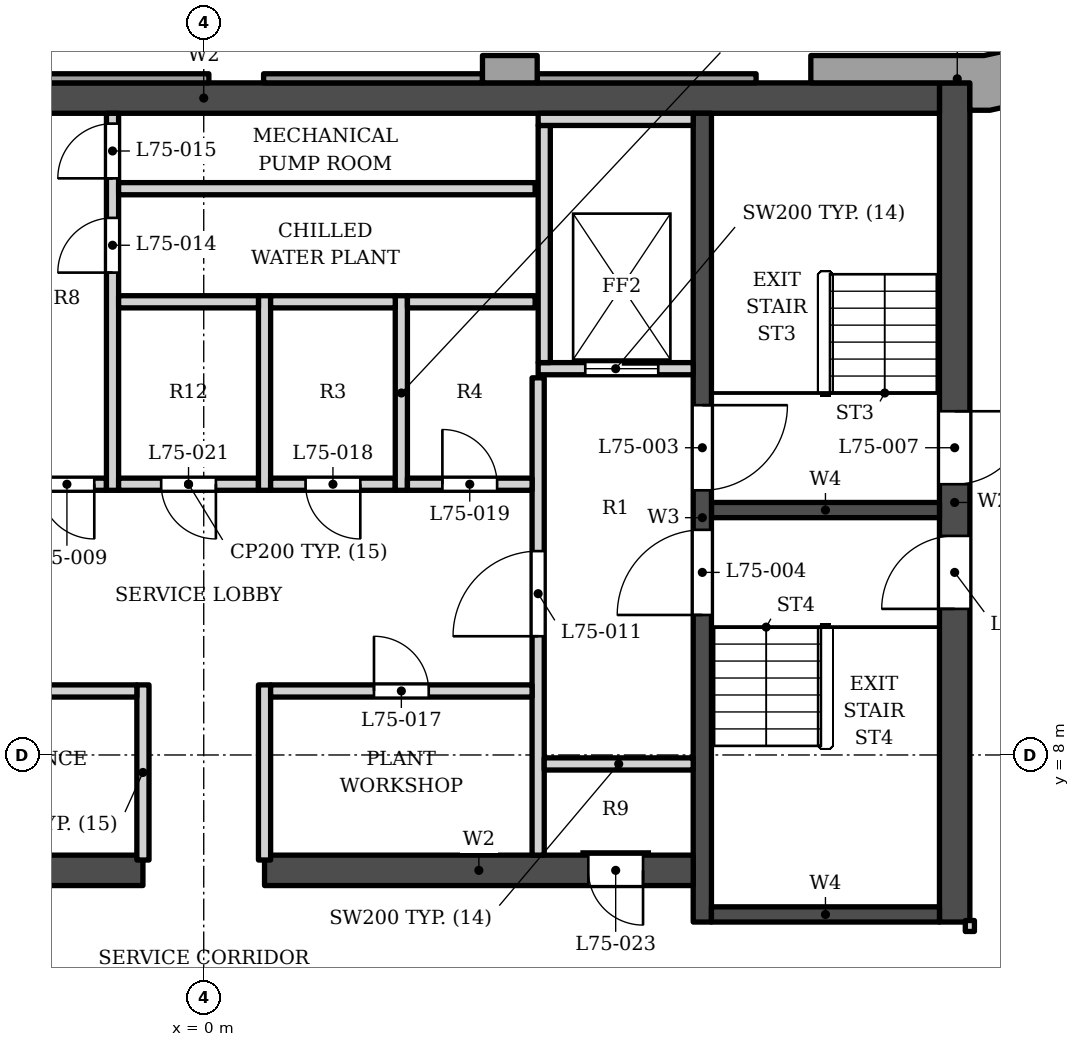
"""IFC4 building model, lengths in metres.
Left out: names, types, materials, properties, quantities, classifications, styles, units other than length and angle.
Written with IfcOpenShell. Run it as: python <this file> out.ifc"""

import sys

from ifc_helpers import new_model, si_unit, direction, frame, frame_2d, origin, place, context, subcontext, project, spatial, polyline, rectangle, outline, extrude, element, fill, save


model = new_model("IFC4")
c1 = context("Model", 3, precision=1e-05, world=origin(), true_north=direction((0.0, 1.0)))
c2 = subcontext(c1, "Body", "Model", "MODEL_VIEW")
j1 = project(units=[si_unit("LENGTHUNIT", "METRE"), si_unit("PLANEANGLEUNIT", "RADIAN")], contexts=[c1])
p1 = place(None, origin())
s1 = spatial("IfcSite", under=j1, at=p1, CompositionType="ELEMENT")
p2 = place(p1, origin())
s2 = spatial("IfcBuilding", under=s1, at=p2, CompositionType="ELEMENT")
p3 = place(p2, frame((0.0, 0.0, 320.5)))
s3 = spatial("IfcBuildingStorey", under=s2, at=p3, CompositionType="ELEMENT", Elevation=320.5)
p4 = place(p3, frame((-12.1, 18.802, 0.0), z_axis=(0.0, 0.0, 1.0), x_axis=(1.0, 0.0, 0.0)))
e1 = element("IfcWall", 1, at=p4, inside=s3, PredefinedType="SHEAR", context=c2, shape_type="SweptSolid", body=[
    extrude(rectangle(XDim=24.2, YDim=0.5, at=frame_2d((12.1, 0.0))), origin(), (0.0, 0.0, 1.0), 5.0),
])
p5 = place(p3, frame((12.35, 5.253, 0.0), z_axis=(0.0, 0.0, 1.0), x_axis=(0.0, 1.0, 0.0)))
e2 = element("IfcWall", 2, at=p5, inside=s3, PredefinedType="SHEAR", context=c2, shape_type="SweptSolid", body=[
    extrude(rectangle(XDim=13.8, YDim=0.5, at=frame_2d((6.9, 0.0))), origin(), (0.0, 0.0, 1.0), 5.0),
])
p6 = place(p5, frame((7.2, 0.0, 0.0)))
e3 = element("IfcOpeningElement", 3, at=p6, cuts=e2, PredefinedType="OPENING", context=c2, shape_type="SweptSolid", body=[
    extrude(rectangle(XDim=1.2, YDim=2.1, at=frame_2d((0.6, 1.05))), frame((0.0, 0.26, 0.0), z_axis=(0.0, -1.0, 0.0), x_axis=(1.0, 0.0, 0.0)), (0.0, 0.0, 1.0), 0.52),
])
p7 = place(p5, frame((5.15, 0.0, 0.0)))
e4 = element("IfcOpeningElement", 4, at=p7, cuts=e2, PredefinedType="OPENING", context=c2, shape_type="SweptSolid", body=[
    extrude(rectangle(XDim=1.2, YDim=2.1, at=frame_2d((0.6, 1.05))), frame((0.0, 0.26, 0.0), z_axis=(0.0, -1.0, 0.0), x_axis=(1.0, 0.0, 0.0)), (0.0, 0.0, 1.0), 0.52),
])
p8 = place(p3, frame((8.2, 5.253, 0.0), z_axis=(0.0, 0.0, 1.0), x_axis=(0.0, 1.0, 0.0)))
e5 = element("IfcWall", 5, at=p8, inside=s3, PredefinedType="SHEAR", context=c2, shape_type="SweptSolid", body=[
    extrude(rectangle(XDim=13.3, YDim=0.3, at=frame_2d((6.65, 0.0))), origin(), (0.0, 0.0, 1.0), 5.0),
])
p9 = place(p8, frame((7.1, 0.0, 0.0)))
e6 = element("IfcOpeningElement", 6, at=p9, cuts=e5, PredefinedType="OPENING", context=c2, shape_type="SweptSolid", body=[
    extrude(rectangle(XDim=1.4, YDim=2.1, at=frame_2d((0.7, 1.05))), frame((0.0, 0.16, 0.0), z_axis=(0.0, -1.0, 0.0), x_axis=(1.0, 0.0, 0.0)), (0.0, 0.0, 1.0), 0.32),
])
p10 = place(p8, frame((5.05, 0.0, 0.0)))
e7 = element("IfcOpeningElement", 7, at=p10, cuts=e5, PredefinedType="OPENING", context=c2, shape_type="SweptSolid", body=[
    extrude(rectangle(XDim=1.4, YDim=2.1, at=frame_2d((0.7, 1.05))), frame((0.0, 0.16, 0.0), z_axis=(0.0, -1.0, 0.0), x_axis=(1.0, 0.0, 0.0)), (0.0, 0.0, 1.0), 0.32),
])
for number, where, z_axis, x_axis in (
    (8, (8.35, 12.028, 0.0), (0.0, 0.0, 1.0), (1.0, 0.0, 0.0)),
    (9, (8.35, 5.378, 0.0), (0.0, 0.0, 1.0), (1.0, 0.0, 0.0)),
):
    element("IfcWall", number, at=place(p3, frame(where, z_axis=z_axis, x_axis=x_axis)), inside=s3, PredefinedType="SHEAR", context=c2, shape_type="SweptSolid", body=[
        extrude(rectangle(XDim=3.75, YDim=0.25, at=frame_2d((1.875, 0.0))), origin(), (0.0, 0.0, 1.0), 5.0),
    ])
p11 = place(p3, frame((-8.05, 6.103, 0.0), z_axis=(0.0, 0.0, 1.0), x_axis=(1.0, 0.0, 0.0)))
e10 = element("IfcWall", 10, at=p11, inside=s3, PredefinedType="SHEAR", context=c2, shape_type="SweptSolid", body=[
    extrude(rectangle(XDim=7.05, YDim=0.5, at=frame_2d((3.525, 0.0))), origin(), (0.0, 0.0, 1.0), 5.0),
])
p12 = place(p11, frame((0.825, 0.0, 0.0)))
e11 = element("IfcOpeningElement", 11, at=p12, cuts=e10, PredefinedType="OPENING", context=c2, shape_type="SweptSolid", body=[
    extrude(rectangle(XDim=0.9, YDim=2.1, at=frame_2d((0.45, 1.05))), frame((0.0, 0.26, 0.0), z_axis=(0.0, -1.0, 0.0), x_axis=(1.0, 0.0, 0.0)), (0.0, 0.0, 1.0), 0.52),
])
p13 = place(p3, frame((1.0, 6.103, 0.0), z_axis=(0.0, 0.0, 1.0), x_axis=(1.0, 0.0, 0.0)))
e12 = element("IfcWall", 12, at=p13, inside=s3, PredefinedType="SHEAR", context=c2, shape_type="SweptSolid", body=[
    extrude(rectangle(XDim=7.05, YDim=0.5, at=frame_2d((3.525, 0.0))), origin(), (0.0, 0.0, 1.0), 5.0),
])
p14 = place(p13, frame((5.325, 0.0, 0.0)))
e13 = element("IfcOpeningElement", 13, at=p14, cuts=e12, PredefinedType="OPENING", context=c2, shape_type="SweptSolid", body=[
    extrude(rectangle(XDim=0.9, YDim=2.1, at=frame_2d((0.45, 1.05))), frame((0.0, 0.26, 0.0), z_axis=(0.0, -1.0, 0.0), x_axis=(1.0, 0.0, 0.0)), (0.0, 0.0, 1.0), 0.52),
])
p15 = place(p3, origin())
e14 = element("IfcWall", 14, at=p15, inside=s3, PredefinedType="SOLIDWALL", context=c2, shape_type="SweptSolid", body=[
    extrude(outline(polyline([(4.584, 19.502), (4.584, 19.052), (5.484, 19.052), (5.484, 19.502), (4.584, 19.502)])), origin(), (0.0, 0.0, 1.0), 3.8),
])
p16 = place(p3, origin())
e15 = element("IfcWall", 15, at=p16, inside=s3, PredefinedType="ELEMENTEDWALL", context=c2, shape_type="SweptSolid", body=[
    extrude(outline(polyline([(9.084, 19.203), (5.484, 19.203), (5.484, 19.052), (9.084, 19.052), (9.084, 19.203)])), origin(), (0.0, 0.0, 1.0), 3.8),
])
p17 = place(p3, origin())
e16 = element("IfcWall", 16, at=p17, inside=s3, PredefinedType="ELEMENTEDWALL", context=c2, shape_type="SweptSolid", body=[
    extrude(outline(polyline([(4.584, 19.203), (0.984, 19.203), (0.984, 19.052), (4.584, 19.052), (4.584, 19.203)])), origin(), (0.0, 0.0, 1.0), 3.8),
])
p18 = place(p3, origin())
e17 = element("IfcWall", 17, at=p18, inside=s3, PredefinedType="ELEMENTEDWALL", context=c2, shape_type="SweptSolid", body=[
    extrude(outline(polyline([(0.084, 19.203), (-3.516, 19.203), (-3.516, 19.052), (0.084, 19.052), (0.084, 19.203)])), origin(), (0.0, 0.0, 1.0), 3.8),
])
p19 = place(p3, origin())
e18 = element("IfcWall", 18, at=p19, inside=s3, PredefinedType="SOLIDWALL", context=c2, shape_type="SweptSolid", body=[
    extrude(outline(polyline([(14.008, 19.761), (12.833, 19.502), (9.984, 19.502), (9.984, 19.052), (12.6, 19.052), (12.6, 18.603), (12.93, 18.603), (14.201, 18.883), (14.008, 19.761)])), origin(), (0.0, 0.0, 1.0), 3.8),
])
for number, where, z_axis, x_axis in (
    (19, (-1.0, 6.273, 0.0), (0.0, 0.0, 1.0), (0.0, 1.0, 0.0)),
    (20, (1.0, 6.273, 0.0), (0.0, 0.0, 1.0), (0.0, 1.0, 0.0)),
):
    element("IfcWall", number, at=place(p3, frame(where, z_axis=z_axis, x_axis=x_axis)), inside=s3, PredefinedType="PARTITIONING", context=c2, shape_type="SweptSolid", body=[
        extrude(rectangle(XDim=2.88, YDim=0.2, at=frame_2d((1.44, 0.0))), origin(), (0.0, 0.0, 1.0), 4.8),
    ])
p20 = place(p3, frame((5.5, 6.353, 0.0), z_axis=(0.0, 0.0, 1.0), x_axis=(0.0, 1.0, 0.0)))
e21 = element("IfcWall", 21, at=p20, inside=s3, PredefinedType="SOLIDWALL", context=c2, shape_type="SweptSolid", body=[
    extrude(rectangle(XDim=7.85, YDim=0.2, at=frame_2d((3.925, 0.0))), origin(), (0.0, 0.0, 1.0), 4.8),
])
p21 = place(p20, frame((3.6, 0.0, 0.0)))
e22 = element("IfcOpeningElement", 22, at=p21, cuts=e21, PredefinedType="OPENING", context=c2, shape_type="SweptSolid", body=[
    extrude(rectangle(XDim=1.4, YDim=2.1, at=frame_2d((0.7, 1.05))), frame((0.0, 0.11, 0.0), z_axis=(0.0, -1.0, 0.0), x_axis=(1.0, 0.0, 0.0)), (0.0, 0.0, 1.0), 0.22),
])
p22 = place(p3, frame((5.6, 7.853, 0.0), z_axis=(0.0, 0.0, 1.0), x_axis=(1.0, 0.0, 0.0)))
e23 = element("IfcWall", 23, at=p22, inside=s3, PredefinedType="SOLIDWALL", context=c2, shape_type="SweptSolid", body=[
    extrude(rectangle(XDim=2.45, YDim=0.2, at=frame_2d((1.225, 0.0))), origin(), (0.0, 0.0, 1.0), 4.8),
])
p23 = place(p3, frame((-5.4, 9.052, 0.0), z_axis=(0.0, 0.0, 1.0), x_axis=(1.0, 0.0, 0.0)))
e24 = element("IfcWall", 24, at=p23, inside=s3, PredefinedType="PARTITIONING", context=c2, shape_type="SweptSolid", body=[
    extrude(rectangle(XDim=4.3, YDim=0.2, at=frame_2d((2.15, 0.0))), origin(), (0.0, 0.0, 1.0), 4.8),
])
p24 = place(p23, frame((1.7, 0.0, 0.0)))
e25 = element("IfcOpeningElement", 25, at=p24, cuts=e24, PredefinedType="OPENING", context=c2, shape_type="SweptSolid", body=[
    extrude(rectangle(XDim=0.9, YDim=2.1, at=frame_2d((0.45, 1.05))), frame((0.0, 0.11, 0.0), z_axis=(0.0, -1.0, 0.0), x_axis=(1.0, 0.0, 0.0)), (0.0, 0.0, 1.0), 0.22),
])
p25 = place(p3, frame((1.1, 9.052, 0.0), z_axis=(0.0, 0.0, 1.0), x_axis=(1.0, 0.0, 0.0)))
e26 = element("IfcWall", 26, at=p25, inside=s3, PredefinedType="PARTITIONING", context=c2, shape_type="SweptSolid", body=[
    extrude(rectangle(XDim=4.3, YDim=0.2, at=frame_2d((2.15, 0.0))), origin(), (0.0, 0.0, 1.0), 4.8),
])
p26 = place(p25, frame((1.7, 0.0, 0.0)))
e27 = element("IfcOpeningElement", 27, at=p26, cuts=e26, PredefinedType="OPENING", context=c2, shape_type="SweptSolid", body=[
    extrude(rectangle(XDim=0.9, YDim=2.1, at=frame_2d((0.45, 1.05))), frame((0.0, 0.11, 0.0), z_axis=(0.0, -1.0, 0.0), x_axis=(1.0, 0.0, 0.0)), (0.0, 0.0, 1.0), 0.22),
])
p27 = place(p3, frame((-2.9, 12.453, 0.0), z_axis=(0.0, 0.0, 1.0), x_axis=(1.0, 0.0, 0.0)))
e28 = element("IfcWall", 28, at=p27, inside=s3, PredefinedType="PARTITIONING", context=c2, shape_type="SweptSolid", body=[
    extrude(rectangle(XDim=1.3, YDim=0.2, at=frame_2d((0.65, 0.0))), origin(), (0.0, 0.0, 1.0), 4.8),
])
p28 = place(p27, frame((0.2, 0.0, 0.0)))
e29 = element("IfcOpeningElement", 29, at=p28, cuts=e28, PredefinedType="OPENING", context=c2, shape_type="SweptSolid", body=[
    extrude(rectangle(XDim=0.9, YDim=2.1, at=frame_2d((0.45, 1.05))), frame((0.0, 0.11, 0.0), z_axis=(0.0, -1.0, 0.0), x_axis=(1.0, 0.0, 0.0)), (0.0, 0.0, 1.0), 0.22),
])
p29 = place(p3, frame((-1.5, 12.353, 0.0), z_axis=(0.0, 0.0, 1.0), x_axis=(0.0, 1.0, 0.0)))
e30 = element("IfcWall", 30, at=p29, inside=s3, PredefinedType="PARTITIONING", context=c2, shape_type="SweptSolid", body=[
    extrude(rectangle(XDim=6.2, YDim=0.2, at=frame_2d((3.1, 0.0))), origin(), (0.0, 0.0, 1.0), 4.8),
])
p30 = place(p29, frame((3.58, 0.0, 0.0)))
e31 = element("IfcOpeningElement", 31, at=p30, cuts=e30, PredefinedType="OPENING", context=c2, shape_type="SweptSolid", body=[
    extrude(rectangle(XDim=0.9, YDim=2.1, at=frame_2d((0.45, 1.05))), frame((0.0, 0.11, 0.0), z_axis=(0.0, -1.0, 0.0), x_axis=(1.0, 0.0, 0.0)), (0.0, 0.0, 1.0), 0.22),
])
p31 = place(p29, frame((5.13, 0.0, 0.0)))
e32 = element("IfcOpeningElement", 32, at=p31, cuts=e30, PredefinedType="OPENING", context=c2, shape_type="SweptSolid", body=[
    extrude(rectangle(XDim=0.9, YDim=2.1, at=frame_2d((0.45, 1.05))), frame((0.0, 0.11, 0.0), z_axis=(0.0, -1.0, 0.0), x_axis=(1.0, 0.0, 0.0)), (0.0, 0.0, 1.0), 0.22),
])
p32 = place(p3, frame((-1.4, 12.453, 0.0), z_axis=(0.0, 0.0, 1.0), x_axis=(1.0, 0.0, 0.0)))
e33 = element("IfcWall", 33, at=p32, inside=s3, PredefinedType="PARTITIONING", context=c2, shape_type="SweptSolid", body=[
    extrude(rectangle(XDim=2.3, YDim=0.2, at=frame_2d((1.15, 0.0))), origin(), (0.0, 0.0, 1.0), 4.8),
])
p33 = place(p32, frame((0.7, 0.0, 0.0)))
e34 = element("IfcOpeningElement", 34, at=p33, cuts=e33, PredefinedType="OPENING", context=c2, shape_type="SweptSolid", body=[
    extrude(rectangle(XDim=0.9, YDim=2.1, at=frame_2d((0.45, 1.05))), frame((0.0, 0.11, 0.0), z_axis=(0.0, -1.0, 0.0), x_axis=(1.0, 0.0, 0.0)), (0.0, 0.0, 1.0), 0.22),
])
p34 = place(p3, frame((1.0, 12.353, 0.0), z_axis=(0.0, 0.0, 1.0), x_axis=(0.0, 1.0, 0.0)))
e35 = element("IfcWall", 35, at=p34, inside=s3, PredefinedType="PARTITIONING", context=c2, shape_type="SweptSolid", body=[
    extrude(rectangle(XDim=3.2, YDim=0.2, at=frame_2d((1.6, 0.0))), origin(), (0.0, 0.0, 1.0), 4.8),
])
p35 = place(p3, frame((1.1, 12.453, 0.0), z_axis=(0.0, 0.0, 1.0), x_axis=(1.0, 0.0, 0.0)))
e36 = element("IfcWall", 36, at=p35, inside=s3, PredefinedType="PARTITIONING", context=c2, shape_type="SweptSolid", body=[
    extrude(rectangle(XDim=2.05, YDim=0.2, at=frame_2d((1.025, 0.0))), origin(), (0.0, 0.0, 1.0), 4.8),
])
p36 = place(p35, frame((0.575, 0.0, 0.0)))
e37 = element("IfcOpeningElement", 37, at=p36, cuts=e36, PredefinedType="OPENING", context=c2, shape_type="SweptSolid", body=[
    extrude(rectangle(XDim=0.9, YDim=2.1, at=frame_2d((0.45, 1.05))), frame((0.0, 0.11, 0.0), z_axis=(0.0, -1.0, 0.0), x_axis=(1.0, 0.0, 0.0)), (0.0, 0.0, 1.0), 0.22),
])
p37 = place(p3, frame((3.25, 12.353, 0.0), z_axis=(0.0, 0.0, 1.0), x_axis=(0.0, 1.0, 0.0)))
e38 = element("IfcWall", 38, at=p37, inside=s3, PredefinedType="PARTITIONING", context=c2, shape_type="SweptSolid", body=[
    extrude(rectangle(XDim=3.2, YDim=0.2, at=frame_2d((1.6, 0.0))), origin(), (0.0, 0.0, 1.0), 4.8),
])
p38 = place(p3, frame((3.35, 12.453, 0.0), z_axis=(0.0, 0.0, 1.0), x_axis=(1.0, 0.0, 0.0)))
e39 = element("IfcWall", 39, at=p38, inside=s3, PredefinedType="PARTITIONING", context=c2, shape_type="SweptSolid", body=[
    extrude(rectangle(XDim=2.05, YDim=0.2, at=frame_2d((1.025, 0.0))), origin(), (0.0, 0.0, 1.0), 4.8),
])
p39 = place(p38, frame((0.575, 0.0, 0.0)))
e40 = element("IfcOpeningElement", 40, at=p39, cuts=e39, PredefinedType="OPENING", context=c2, shape_type="SweptSolid", body=[
    extrude(rectangle(XDim=0.9, YDim=2.1, at=frame_2d((0.45, 1.05))), frame((0.0, 0.11, 0.0), z_axis=(0.0, -1.0, 0.0), x_axis=(1.0, 0.0, 0.0)), (0.0, 0.0, 1.0), 0.22),
])
p40 = place(p3, frame((5.5, 14.353, 0.0), z_axis=(0.0, 0.0, 1.0), x_axis=(1.0, 0.0, 0.0)))
e41 = element("IfcWall", 41, at=p40, inside=s3, PredefinedType="SOLIDWALL", context=c2, shape_type="SweptSolid", body=[
    extrude(rectangle(XDim=2.55, YDim=0.2, at=frame_2d((1.275, 0.0))), origin(), (0.0, 0.0, 1.0), 4.8),
])
p41 = place(p40, frame((0.775, 0.0, 0.0)))
e42 = element("IfcOpeningElement", 42, at=p41, cuts=e41, PredefinedType="OPENING", context=c2, shape_type="SweptSolid", body=[
    extrude(rectangle(XDim=1.2, YDim=2.1, at=frame_2d((0.6, 1.05))), frame((0.0, 0.11, 0.0), z_axis=(0.0, -1.0, 0.0), x_axis=(1.0, 0.0, 0.0)), (0.0, 0.0, 1.0), 0.22),
])
p42 = place(p3, frame((5.6, 14.453, 0.0), z_axis=(0.0, 0.0, 1.0), x_axis=(0.0, 1.0, 0.0)))
e43 = element("IfcWall", 43, at=p42, inside=s3, PredefinedType="SOLIDWALL", context=c2, shape_type="SweptSolid", body=[
    extrude(rectangle(XDim=3.9, YDim=0.2, at=frame_2d((1.95, 0.0))), origin(), (0.0, 0.0, 1.0), 4.8),
])
p43 = place(p3, frame((-1.4, 15.453, 0.0), z_axis=(0.0, 0.0, 1.0), x_axis=(1.0, 0.0, 0.0)))
e44 = element("IfcWall", 44, at=p43, inside=s3, PredefinedType="PARTITIONING", context=c2, shape_type="SweptSolid", body=[
    extrude(rectangle(XDim=2.3, YDim=0.2, at=frame_2d((1.15, 0.0))), origin(), (0.0, 0.0, 1.0), 4.8),
])
p44 = place(p3, frame((1.1, 15.453, 0.0), z_axis=(0.0, 0.0, 1.0), x_axis=(1.0, 0.0, 0.0)))
e45 = element("IfcWall", 45, at=p44, inside=s3, PredefinedType="PARTITIONING", context=c2, shape_type="SweptSolid", body=[
    extrude(rectangle(XDim=2.05, YDim=0.2, at=frame_2d((1.025, 0.0))), origin(), (0.0, 0.0, 1.0), 4.8),
])
p45 = place(p3, frame((3.35, 15.453, 0.0), z_axis=(0.0, 0.0, 1.0), x_axis=(1.0, 0.0, 0.0)))
e46 = element("IfcWall", 46, at=p45, inside=s3, PredefinedType="SOLIDWALL", context=c2, shape_type="SweptSolid", body=[
    extrude(rectangle(XDim=2.1, YDim=0.2, at=frame_2d((1.05, 0.0))), origin(), (0.0, 0.0, 1.0), 4.8),
])
p46 = place(p3, frame((-1.4, 17.312, 0.0), z_axis=(0.0, 0.0, 1.0), x_axis=(1.0, 0.0, 0.0)))
e47 = element("IfcWall", 47, at=p46, inside=s3, PredefinedType="SOLIDWALL", context=c2, shape_type="SweptSolid", body=[
    extrude(rectangle(XDim=6.85, YDim=0.2, at=frame_2d((3.425, 0.0))), origin(), (0.0, 0.0, 1.0), 4.8),
])
p47 = place(p3, frame((5.5, 18.453, 0.0), z_axis=(0.0, 0.0, 1.0), x_axis=(1.0, 0.0, 0.0)))
e48 = element("IfcWall", 48, at=p47, inside=s3, PredefinedType="SOLIDWALL", context=c2, shape_type="SweptSolid", body=[
    extrude(rectangle(XDim=2.55, YDim=0.2, at=frame_2d((1.275, 0.0))), origin(), (0.0, 0.0, 1.0), 4.8),
])
p48 = place(p3, frame((12.6, 5.098, 0.0), z_axis=(0.0, 0.0, 1.0), x_axis=(0.0, 1.0, 0.0)))
e49 = element("IfcWall", 49, at=p48, inside=s3, PredefinedType="PARTITIONING", context=c2, shape_type="SweptSolid", body=[
    extrude(rectangle(XDim=0.18, YDim=0.15, at=frame_2d((0.09, 0.0))), origin(), (0.0, 0.0, 1.0), 4.8),
])
p49 = place(p41, origin())
e50 = element("IfcDoor", 50, at=p49, inside=s3, OperationType="DOUBLE_DOOR_SLIDING", PredefinedType="DOOR", context=c2, shape_type="SweptSolid", body=[
    extrude(rectangle(XDim=1.2, YDim=2.1, at=frame_2d((0.6, 1.05))), frame((0.0, 0.025, 0.0), z_axis=(0.0, -1.0, 0.0), x_axis=(1.0, 0.0, 0.0)), (0.0, 0.0, 1.0), 0.05),
])
fill(e42, e50)
p50 = place(p9, origin())
e51 = element("IfcDoor", 51, at=p50, inside=s3, OperationType="SINGLE_SWING_RIGHT", PredefinedType="DOOR", context=c2, shape_type="SweptSolid", body=[
    extrude(rectangle(XDim=1.4, YDim=2.1, at=frame_2d((0.7, 1.05))), frame((0.0, 0.025, 0.0), z_axis=(0.0, -1.0, 0.0), x_axis=(1.0, 0.0, 0.0)), (0.0, 0.0, 1.0), 0.05),
])
fill(e6, e51)
p51 = place(p10, origin())
e52 = element("IfcDoor", 52, at=p51, inside=s3, OperationType="SINGLE_SWING_LEFT", PredefinedType="DOOR", context=c2, shape_type="SweptSolid", body=[
    extrude(rectangle(XDim=1.4, YDim=2.1, at=frame_2d((0.7, 1.05))), frame((0.0, 0.025, 0.0), z_axis=(0.0, -1.0, 0.0), x_axis=(1.0, 0.0, 0.0)), (0.0, 0.0, 1.0), 0.05),
])
fill(e7, e52)
p52 = place(p6, origin())
e53 = element("IfcDoor", 53, at=p52, inside=s3, OperationType="SINGLE_SWING_RIGHT", PredefinedType="DOOR", context=c2, shape_type="SweptSolid", body=[
    extrude(rectangle(XDim=1.2, YDim=2.1, at=frame_2d((0.6, 1.05))), frame((0.0, 0.025, 0.0), z_axis=(0.0, -1.0, 0.0), x_axis=(1.0, 0.0, 0.0)), (0.0, 0.0, 1.0), 0.05),
])
fill(e3, e53)
p53 = place(p7, origin())
e54 = element("IfcDoor", 54, at=p53, inside=s3, OperationType="SINGLE_SWING_LEFT", PredefinedType="DOOR", context=c2, shape_type="SweptSolid", body=[
    extrude(rectangle(XDim=1.2, YDim=2.1, at=frame_2d((0.6, 1.05))), frame((0.0, 0.025, 0.0), z_axis=(0.0, -1.0, 0.0), x_axis=(1.0, 0.0, 0.0)), (0.0, 0.0, 1.0), 0.05),
])
fill(e4, e54)
p54 = place(p28, origin())
e55 = element("IfcDoor", 55, at=p54, inside=s3, OperationType="SINGLE_SWING_RIGHT", PredefinedType="DOOR", context=c2, shape_type="SweptSolid", body=[
    extrude(rectangle(XDim=0.9, YDim=2.1, at=frame_2d((0.45, 1.05))), frame((0.0, 0.025, 0.0), z_axis=(0.0, -1.0, 0.0), x_axis=(1.0, 0.0, 0.0)), (0.0, 0.0, 1.0), 0.05),
])
fill(e29, e55)
p55 = place(p21, origin())
e56 = element("IfcDoor", 56, at=p55, inside=s3, OperationType="SINGLE_SWING_LEFT", PredefinedType="DOOR", context=c2, shape_type="SweptSolid", body=[
    extrude(rectangle(XDim=1.4, YDim=2.1, at=frame_2d((0.7, 1.05))), frame((0.0, 0.025, 0.0), z_axis=(0.0, -1.0, 0.0), x_axis=(1.0, 0.0, 0.0)), (0.0, 0.0, 1.0), 0.05),
])
fill(e22, e56)
p56 = place(p30, origin())
e57 = element("IfcDoor", 57, at=p56, inside=s3, OperationType="SINGLE_SWING_LEFT", PredefinedType="DOOR", context=c2, shape_type="SweptSolid", body=[
    extrude(rectangle(XDim=0.9, YDim=2.1, at=frame_2d((0.45, 1.05))), frame((0.0, 0.025, 0.0), z_axis=(0.0, -1.0, 0.0), x_axis=(1.0, 0.0, 0.0)), (0.0, 0.0, 1.0), 0.05),
])
fill(e31, e57)
p57 = place(p31, origin())
e58 = element("IfcDoor", 58, at=p57, inside=s3, OperationType="SINGLE_SWING_LEFT", PredefinedType="DOOR", context=c2, shape_type="SweptSolid", body=[
    extrude(rectangle(XDim=0.9, YDim=2.1, at=frame_2d((0.45, 1.05))), frame((0.0, 0.025, 0.0), z_axis=(0.0, -1.0, 0.0), x_axis=(1.0, 0.0, 0.0)), (0.0, 0.0, 1.0), 0.05),
])
fill(e32, e58)
p58 = place(p26, origin())
e59 = element("IfcDoor", 59, at=p58, inside=s3, OperationType="SINGLE_SWING_LEFT", PredefinedType="DOOR", context=c2, shape_type="SweptSolid", body=[
    extrude(rectangle(XDim=0.9, YDim=2.1, at=frame_2d((0.45, 1.05))), frame((0.0, 0.025, 0.0), z_axis=(0.0, -1.0, 0.0), x_axis=(1.0, 0.0, 0.0)), (0.0, 0.0, 1.0), 0.05),
])
fill(e27, e59)
p59 = place(p36, origin())
e60 = element("IfcDoor", 60, at=p59, inside=s3, OperationType="SINGLE_SWING_RIGHT", PredefinedType="DOOR", context=c2, shape_type="SweptSolid", body=[
    extrude(rectangle(XDim=0.9, YDim=2.1, at=frame_2d((0.45, 1.05))), frame((0.0, 0.025, 0.0), z_axis=(0.0, -1.0, 0.0), x_axis=(1.0, 0.0, 0.0)), (0.0, 0.0, 1.0), 0.05),
])
fill(e37, e60)
p60 = place(p39, origin())
e61 = element("IfcDoor", 61, at=p60, inside=s3, OperationType="SINGLE_SWING_LEFT", PredefinedType="DOOR", context=c2, shape_type="SweptSolid", body=[
    extrude(rectangle(XDim=0.9, YDim=2.1, at=frame_2d((0.45, 1.05))), frame((0.0, 0.025, 0.0), z_axis=(0.0, -1.0, 0.0), x_axis=(1.0, 0.0, 0.0)), (0.0, 0.0, 1.0), 0.05),
])
fill(e40, e61)
p61 = place(p33, origin())
e62 = element("IfcDoor", 62, at=p61, inside=s3, OperationType="SINGLE_SWING_RIGHT", PredefinedType="DOOR", context=c2, shape_type="SweptSolid", body=[
    extrude(rectangle(XDim=0.9, YDim=2.1, at=frame_2d((0.45, 1.05))), frame((0.0, 0.025, 0.0), z_axis=(0.0, -1.0, 0.0), x_axis=(1.0, 0.0, 0.0)), (0.0, 0.0, 1.0), 0.05),
])
fill(e34, e62)
p62 = place(p14, origin())
e63 = element("IfcDoor", 63, at=p62, inside=s3, OperationType="SINGLE_SWING_RIGHT", PredefinedType="DOOR", context=c2, shape_type="SweptSolid", body=[
    extrude(rectangle(XDim=0.9, YDim=2.1, at=frame_2d((0.45, 1.05))), frame((0.0, 0.025, 0.0), z_axis=(0.0, -1.0, 0.0), x_axis=(1.0, 0.0, 0.0)), (0.0, 0.0, 1.0), 0.05),
])
fill(e13, e63)
save(model, sys.argv[1])
